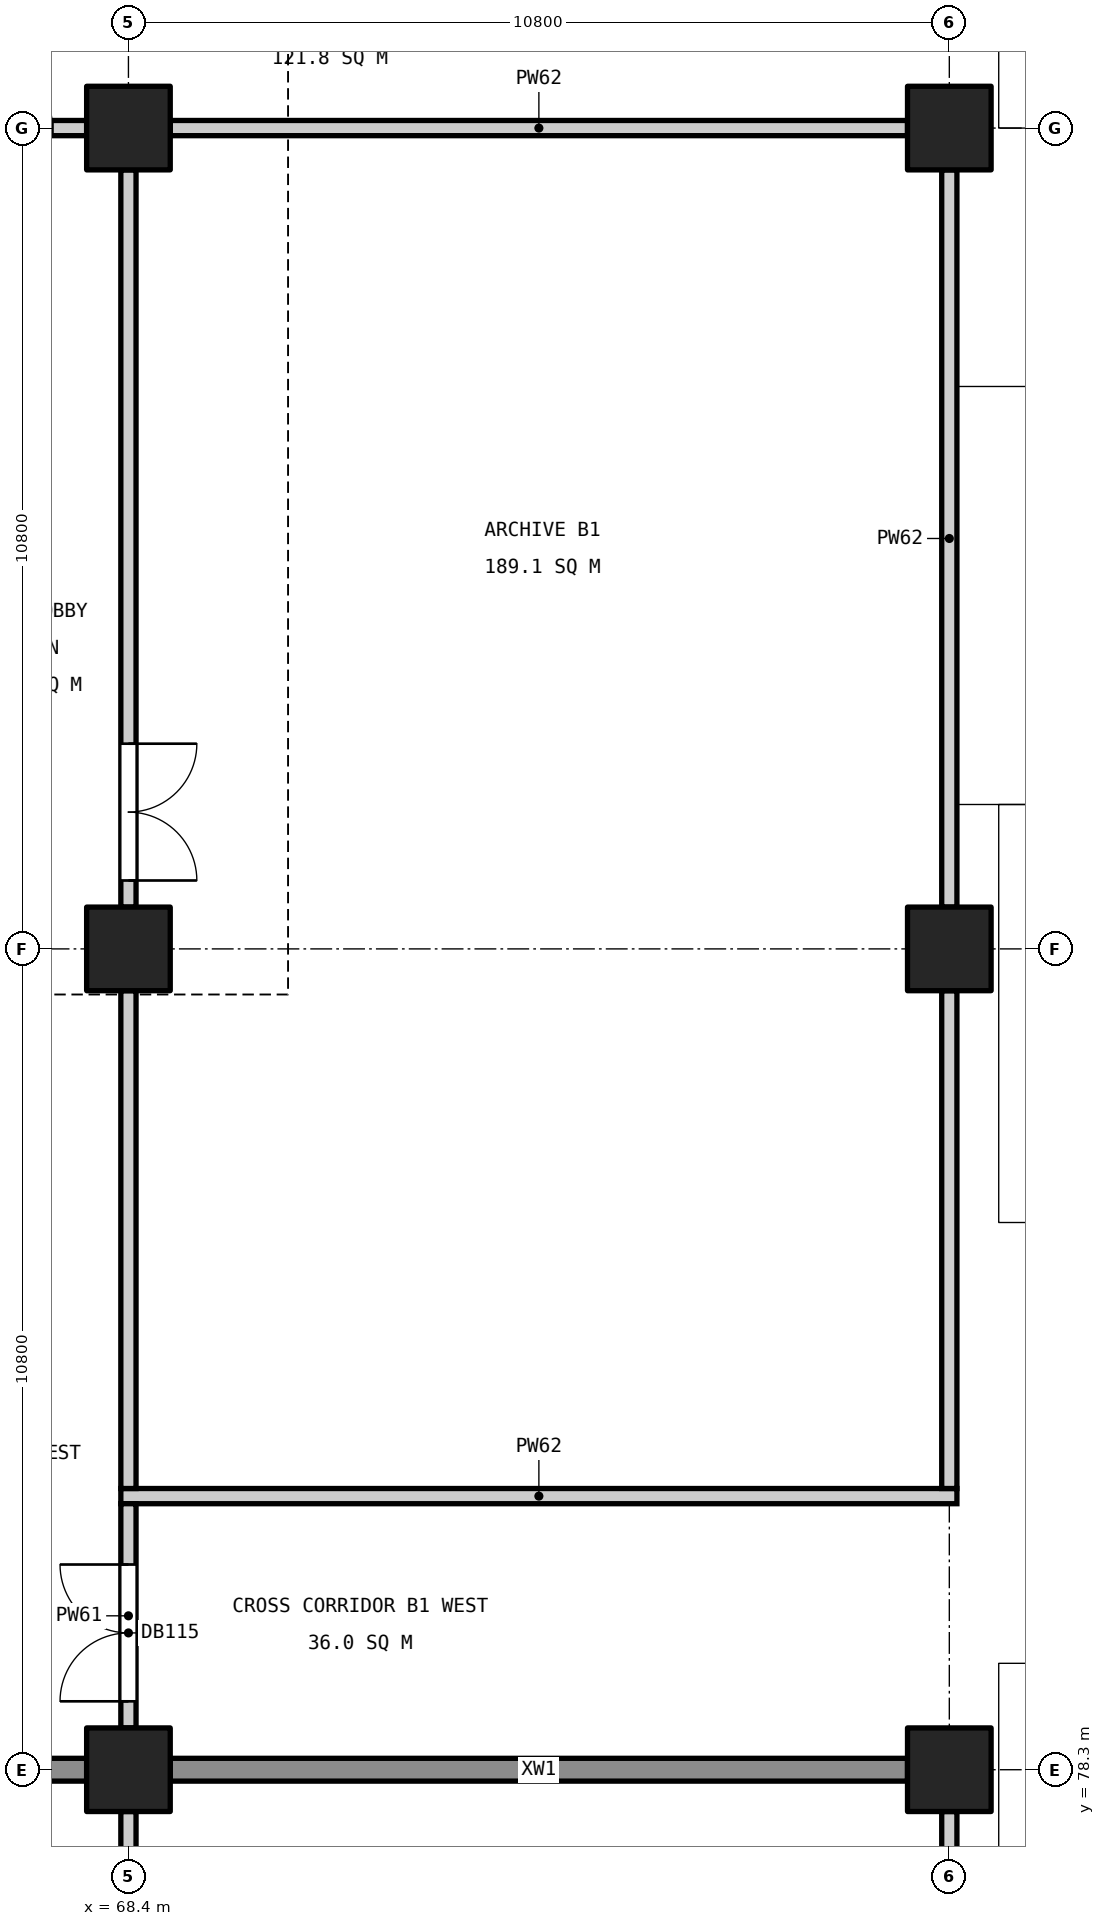
"""IFC4 building model, lengths in metres.
Left out: names, types, materials, properties, quantities, classifications, styles, units other than length and angle.
Written with IfcOpenShell. Run it as: python <this file> out.ifc"""

import sys

from ifc_helpers import new_model, si_unit, direction, frame, frame_2d, origin, origin_2d, place, context, subcontext, project, spatial, rectangle, extrude, element, fill, save


model = new_model("IFC4")
c1 = context("Model", 3, precision=1e-05, world=origin(), true_north=direction((0.0, 1.0)))
c2 = subcontext(c1, "Body", "Model", "MODEL_VIEW")
j1 = project(units=[si_unit("LENGTHUNIT", "METRE"), si_unit("PLANEANGLEUNIT", "RADIAN")], contexts=[c1])
p1 = place(None, origin())
s1 = spatial("IfcSite", under=j1, at=p1, CompositionType="ELEMENT")
p2 = place(p1, origin())
s2 = spatial("IfcBuilding", under=s1, at=p2, CompositionType="ELEMENT")
p3 = place(p2, frame((0.0, 0.0, -4.8)))
s3 = spatial("IfcBuildingStorey", under=s2, at=p3, CompositionType="ELEMENT", Elevation=-4.8)
for number, where, z_axis, x_axis in (
    (1, (68.4, 78.3, 0.0), (0.0, 0.0, 1.0), (1.0, 0.0, 0.0)),
    (2, (68.4, 89.1, 0.0), (0.0, 0.0, 1.0), (1.0, 0.0, 0.0)),
    (3, (68.4, 99.9, 0.0), (0.0, 0.0, 1.0), (1.0, 0.0, 0.0)),
    (4, (79.2, 78.3, 0.0), (0.0, 0.0, 1.0), (1.0, 0.0, 0.0)),
    (5, (79.2, 89.1, 0.0), (0.0, 0.0, 1.0), (1.0, 0.0, 0.0)),
    (6, (79.2, 99.9, 0.0), (0.0, 0.0, 1.0), (1.0, 0.0, 0.0)),
):
    element("IfcColumn", number, at=place(p3, frame(where, z_axis=z_axis, x_axis=x_axis)), inside=s3, PredefinedType="COLUMN", context=c2, shape_type="SweptSolid", body=[
        extrude(rectangle(XDim=1.1, YDim=1.1, at=origin_2d()), origin(), (0.0, 0.0, 1.0), 4.5),
    ])
p4 = place(p3, frame((61.75, 78.3, 0.0), z_axis=(0.0, 0.0, 1.0), x_axis=(1.0, 0.0, 0.0)))
e7 = element("IfcWall", 7, at=p4, inside=s3, PredefinedType="SHEAR", context=c2, shape_type="SweptSolid", body=[
    extrude(rectangle(XDim=6.1, YDim=0.3, at=frame_2d((3.05, 0.0))), origin(), (0.0, 0.0, 1.0), 4.5),
])
p5 = place(p4, frame((2.15, 0.0, 0.0)))
e8 = element("IfcOpeningElement", 8, at=p5, cuts=e7, PredefinedType="OPENING", context=c2, shape_type="SweptSolid", body=[
    extrude(rectangle(XDim=1.8, YDim=2.1, at=frame_2d((0.9, 1.05))), frame((0.0, 0.16, 0.0), z_axis=(0.0, -1.0, 0.0), x_axis=(1.0, 0.0, 0.0)), (0.0, 0.0, 1.0), 0.32),
])
p6 = place(p3, frame((68.95, 78.3, 0.0), z_axis=(0.0, 0.0, 1.0), x_axis=(1.0, 0.0, 0.0)))
e9 = element("IfcWall", 9, at=p6, inside=s3, PredefinedType="SHEAR", context=c2, shape_type="SweptSolid", body=[
    extrude(rectangle(XDim=9.7, YDim=0.3, at=frame_2d((4.85, 0.0))), origin(), (0.0, 0.0, 1.0), 4.5),
])
p7 = place(p3, frame((68.3, 81.9, 0.0), z_axis=(0.0, 0.0, 1.0), x_axis=(1.0, 0.0, 0.0)))
e10 = element("IfcWall", 10, at=p7, inside=s3, PredefinedType="PARTITIONING", context=c2, shape_type="SweptSolid", body=[
    extrude(rectangle(XDim=11.0, YDim=0.2, at=frame_2d((5.5, 0.0))), origin(), (0.0, 0.0, 1.0), 3.7),
])
p8 = place(p3, frame((65.95, 99.9, 0.0), z_axis=(0.0, 0.0, 1.0), x_axis=(1.0, 0.0, 0.0)))
e11 = element("IfcWall", 11, at=p8, inside=s3, PredefinedType="PARTITIONING", context=c2, shape_type="SweptSolid", body=[
    extrude(rectangle(XDim=1.9, YDim=0.2, at=frame_2d((0.95, 0.0))), origin(), (0.0, 0.0, 1.0), 3.7),
])
p9 = place(p8, frame((0.45, 0.0, 0.0)))
e12 = element("IfcOpeningElement", 12, at=p9, cuts=e11, PredefinedType="OPENING", context=c2, shape_type="SweptSolid", body=[
    extrude(rectangle(XDim=1.0, YDim=2.1, at=frame_2d((0.5, 1.05))), frame((0.0, 0.11, 0.0), z_axis=(0.0, -1.0, 0.0), x_axis=(1.0, 0.0, 0.0)), (0.0, 0.0, 1.0), 0.22),
])
p10 = place(p3, frame((68.95, 99.9, 0.0), z_axis=(0.0, 0.0, 1.0), x_axis=(1.0, 0.0, 0.0)))
e13 = element("IfcWall", 13, at=p10, inside=s3, PredefinedType="PARTITIONING", context=c2, shape_type="SweptSolid", body=[
    extrude(rectangle(XDim=9.7, YDim=0.2, at=frame_2d((4.85, 0.0))), origin(), (0.0, 0.0, 1.0), 3.7),
])
p11 = place(p3, frame((68.4, 71.2, 0.0), z_axis=(0.0, 0.0, 1.0), x_axis=(0.0, 1.0, 0.0)))
e14 = element("IfcWall", 14, at=p11, inside=s3, PredefinedType="PARTITIONING", context=c2, shape_type="SweptSolid", body=[
    extrude(rectangle(XDim=6.55, YDim=0.2, at=frame_2d((3.275, 0.0))), origin(), (0.0, 0.0, 1.0), 3.4),
])
p12 = place(p11, frame((0.3, 0.0, 0.0)))
e15 = element("IfcOpeningElement", 15, at=p12, cuts=e14, PredefinedType="OPENING", context=c2, shape_type="SweptSolid", body=[
    extrude(rectangle(XDim=1.8, YDim=2.1, at=frame_2d((0.9, 1.05))), frame((0.0, 0.11, 0.0), z_axis=(0.0, -1.0, 0.0), x_axis=(1.0, 0.0, 0.0)), (0.0, 0.0, 1.0), 0.22),
])
p13 = place(p3, frame((68.4, 78.85, 0.0), z_axis=(0.0, 0.0, 1.0), x_axis=(0.0, 1.0, 0.0)))
e16 = element("IfcWall", 16, at=p13, inside=s3, PredefinedType="PARTITIONING", context=c2, shape_type="SweptSolid", body=[
    extrude(rectangle(XDim=2.95, YDim=0.2, at=frame_2d((1.475, 0.0))), origin(), (0.0, 0.0, 1.0), 3.4),
])
p14 = place(p13, frame((0.35, 0.0, 0.0)))
e17 = element("IfcOpeningElement", 17, at=p14, cuts=e16, PredefinedType="OPENING", context=c2, shape_type="SweptSolid", body=[
    extrude(rectangle(XDim=1.8, YDim=2.1, at=frame_2d((0.9, 1.05))), frame((0.0, 0.11, 0.0), z_axis=(0.0, -1.0, 0.0), x_axis=(1.0, 0.0, 0.0)), (0.0, 0.0, 1.0), 0.22),
])
p15 = place(p3, frame((68.4, 82.0, 0.0), z_axis=(0.0, 0.0, 1.0), x_axis=(0.0, 1.0, 0.0)))
e18 = element("IfcWall", 18, at=p15, inside=s3, PredefinedType="PARTITIONING", context=c2, shape_type="SweptSolid", body=[
    extrude(rectangle(XDim=6.55, YDim=0.2, at=frame_2d((3.275, 0.0))), origin(), (0.0, 0.0, 1.0), 3.4),
])
p16 = place(p3, frame((68.4, 89.65, 0.0), z_axis=(0.0, 0.0, 1.0), x_axis=(0.0, 1.0, 0.0)))
e19 = element("IfcWall", 19, at=p16, inside=s3, PredefinedType="PARTITIONING", context=c2, shape_type="SweptSolid", body=[
    extrude(rectangle(XDim=9.7, YDim=0.2, at=frame_2d((4.85, 0.0))), origin(), (0.0, 0.0, 1.0), 3.4),
])
p17 = place(p16, frame((0.35, 0.0, 0.0)))
e20 = element("IfcOpeningElement", 20, at=p17, cuts=e19, PredefinedType="OPENING", context=c2, shape_type="SweptSolid", body=[
    extrude(rectangle(XDim=1.8, YDim=2.1, at=frame_2d((0.9, 1.05))), frame((0.0, 0.11, 0.0), z_axis=(0.0, -1.0, 0.0), x_axis=(1.0, 0.0, 0.0)), (0.0, 0.0, 1.0), 0.22),
])
p18 = place(p3, frame((79.2, 68.05, 0.0), z_axis=(0.0, 0.0, 1.0), x_axis=(0.0, 1.0, 0.0)))
e21 = element("IfcWall", 21, at=p18, inside=s3, PredefinedType="PARTITIONING", context=c2, shape_type="SweptSolid", body=[
    extrude(rectangle(XDim=9.7, YDim=0.2, at=frame_2d((4.85, 0.0))), origin(), (0.0, 0.0, 1.0), 3.4),
])
p19 = place(p3, frame((79.2, 82.0, 0.0), z_axis=(0.0, 0.0, 1.0), x_axis=(0.0, 1.0, 0.0)))
e22 = element("IfcWall", 22, at=p19, inside=s3, PredefinedType="PARTITIONING", context=c2, shape_type="SweptSolid", body=[
    extrude(rectangle(XDim=6.55, YDim=0.2, at=frame_2d((3.275, 0.0))), origin(), (0.0, 0.0, 1.0), 3.4),
])
p20 = place(p3, frame((79.2, 89.65, 0.0), z_axis=(0.0, 0.0, 1.0), x_axis=(0.0, 1.0, 0.0)))
e23 = element("IfcWall", 23, at=p20, inside=s3, PredefinedType="PARTITIONING", context=c2, shape_type="SweptSolid", body=[
    extrude(rectangle(XDim=9.7, YDim=0.2, at=frame_2d((4.85, 0.0))), origin(), (0.0, 0.0, 1.0), 3.4),
])
p21 = place(p17, frame((1.8, 0.0, 0.0), z_axis=(0.0, 0.0, 1.0), x_axis=(-1.0, 0.0, 0.0)))
e24 = element("IfcDoor", 24, at=p21, inside=s3, OperationType="DOUBLE_DOOR_SINGLE_SWING", PredefinedType="DOOR", context=c2, shape_type="SweptSolid", body=[
    extrude(rectangle(XDim=1.8, YDim=2.1, at=frame_2d((0.9, 1.05))), frame((0.0, 0.025, 0.0), z_axis=(0.0, -1.0, 0.0), x_axis=(1.0, 0.0, 0.0)), (0.0, 0.0, 1.0), 0.05),
])
fill(e20, e24)
p22 = place(p14, origin())
e25 = element("IfcDoor", 25, at=p22, inside=s3, OperationType="DOUBLE_DOOR_SINGLE_SWING", PredefinedType="DOOR", context=c2, shape_type="SweptSolid", body=[
    extrude(rectangle(XDim=1.8, YDim=2.1, at=frame_2d((0.9, 1.05))), frame((0.0, 0.025, 0.0), z_axis=(0.0, -1.0, 0.0), x_axis=(1.0, 0.0, 0.0)), (0.0, 0.0, 1.0), 0.05),
])
fill(e17, e25)
save(model, sys.argv[1])
